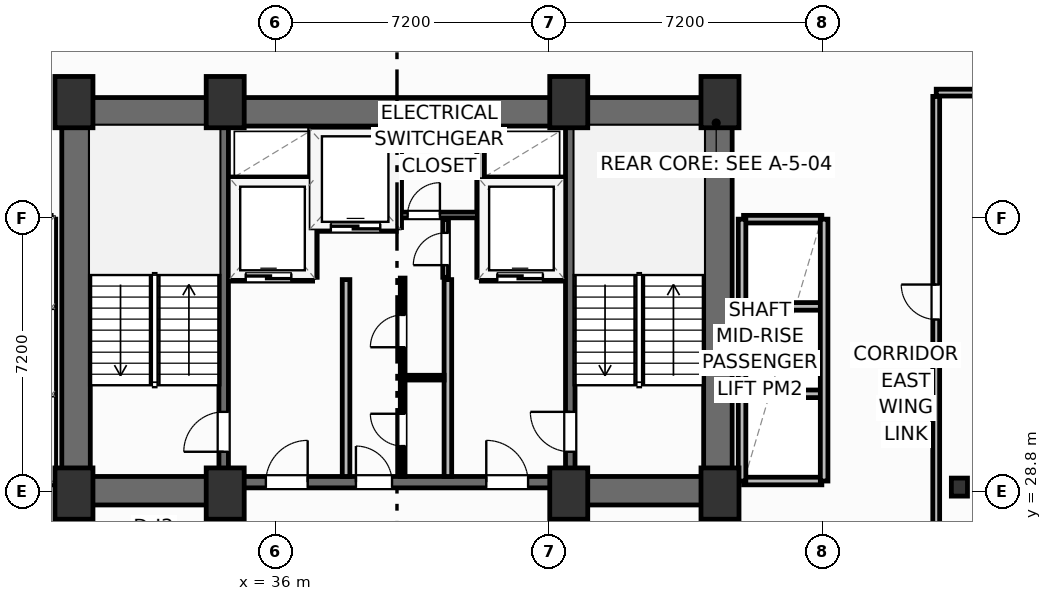
"""IFC4 building model, lengths in metres.
Left out: names, types, materials, properties, quantities, classifications, styles, units other than length and angle.
Written with IfcOpenShell. Run it as: python <this file> out.ifc"""

import sys

from ifc_helpers import new_model, si_unit, direction, frame, frame_2d, origin, origin_2d, place, context, subcontext, project, spatial, rectangle, i_section, extrude, element, fill, save


model = new_model("IFC4")
c1 = context("Model", 3, precision=1e-05, world=origin(), true_north=direction((0.0, 1.0)))
c2 = subcontext(c1, "Body", "Model", "MODEL_VIEW")
j1 = project(units=[si_unit("LENGTHUNIT", "METRE"), si_unit("PLANEANGLEUNIT", "RADIAN")], contexts=[c1])
p1 = place(None, origin())
s1 = spatial("IfcSite", under=j1, at=p1, CompositionType="ELEMENT")
p2 = place(p1, origin())
s2 = spatial("IfcBuilding", under=s1, at=p2, CompositionType="ELEMENT")
p3 = place(p2, frame((0.0, 0.0, 87.3)))
s3 = spatial("IfcBuildingStorey", under=s2, at=p3, CompositionType="ELEMENT", Elevation=87.3)
for number, where, z_axis, x_axis in (
    (1, (30.7, 28.75, 0.0), (0.0, 0.0, 1.0), (1.0, 0.0, 0.0)),
    (2, (34.68, 28.75, 0.0), (0.0, 0.0, 1.0), (1.0, 0.0, 0.0)),
    (3, (43.72, 28.75, 0.0), (0.0, 0.0, 1.0), (1.0, 0.0, 0.0)),
    (4, (47.7, 28.75, 0.0), (0.0, 0.0, 1.0), (1.0, 0.0, 0.0)),
    (5, (30.7, 39.05, 0.0), (0.0, 0.0, 1.0), (1.0, 0.0, 0.0)),
    (6, (34.68, 39.05, 0.0), (0.0, 0.0, 1.0), (1.0, 0.0, 0.0)),
    (7, (43.72, 39.05, 0.0), (0.0, 0.0, 1.0), (1.0, 0.0, 0.0)),
    (8, (47.7, 39.05, 0.0), (0.0, 0.0, 1.0), (1.0, 0.0, 0.0)),
):
    element("IfcColumn", number, at=place(p3, frame(where, z_axis=z_axis, x_axis=x_axis)), inside=s3, PredefinedType="COLUMN", context=c2, shape_type="SweptSolid", body=[
        extrude(rectangle(XDim=1.0, YDim=1.35, at=origin_2d()), origin(), (0.0, 0.0, 1.0), 3.7),
    ])
p4 = place(p3, frame((54.0, 28.92, 0.0), z_axis=(0.0, 0.0, 1.0), x_axis=(1.0, 0.0, 0.0)))
e9 = element("IfcColumn", 9, at=p4, inside=s3, PredefinedType="COLUMN", context=c2, shape_type="SweptSolid", body=[
    extrude(i_section(OverallWidth=0.424, OverallDepth=0.474, WebThickness=0.048, FlangeThickness=0.077, FilletRadius=0.025, at=origin_2d()), origin(), (0.0, 0.0, 1.0), 3.7),
])
p5 = place(p3, frame((30.38, 38.795, 0.0), z_axis=(0.0, 0.0, 1.0), x_axis=(1.0, 0.0, 0.0)))
e10 = element("IfcWall", 10, at=p5, inside=s3, PredefinedType="SHEAR", context=c2, shape_type="SweptSolid", body=[
    extrude(rectangle(XDim=17.64, YDim=0.75, at=frame_2d((8.82, 0.0))), origin(), (0.0, 0.0, 1.0), 3.45),
])
for number, where, z_axis, x_axis in (
    (11, (30.755, 29.2, 0.0), (0.0, 0.0, 1.0), (0.0, 1.0, 0.0)),
    (12, (47.645, 29.2, 0.0), (0.0, 0.0, 1.0), (0.0, 1.0, 0.0)),
):
    element("IfcWall", number, at=place(p3, frame(where, z_axis=z_axis, x_axis=x_axis)), inside=s3, PredefinedType="SHEAR", context=c2, shape_type="SweptSolid", body=[
        extrude(rectangle(XDim=9.22, YDim=0.75, at=frame_2d((4.61, 0.0))), origin(), (0.0, 0.0, 1.0), 3.45),
    ])
p6 = place(p3, frame((30.38, 28.825, 0.0), z_axis=(0.0, 0.0, 1.0), x_axis=(1.0, 0.0, 0.0)))
e13 = element("IfcWall", 13, at=p6, inside=s3, PredefinedType="SHEAR", context=c2, shape_type="SweptSolid", body=[
    extrude(rectangle(XDim=4.42, YDim=0.75, at=frame_2d((2.21, 0.0))), origin(), (0.0, 0.0, 1.0), 3.45),
])
p7 = place(p3, frame((43.6, 28.825, 0.0), z_axis=(0.0, 0.0, 1.0), x_axis=(1.0, 0.0, 0.0)))
e14 = element("IfcWall", 14, at=p7, inside=s3, PredefinedType="SHEAR", context=c2, shape_type="SweptSolid", body=[
    extrude(rectangle(XDim=4.42, YDim=0.75, at=frame_2d((2.21, 0.0))), origin(), (0.0, 0.0, 1.0), 3.45),
])
p8 = place(p3, frame((34.8, 29.05, 0.0), z_axis=(0.0, 0.0, 1.0), x_axis=(1.0, 0.0, 0.0)))
e15 = element("IfcWall", 15, at=p8, inside=s3, PredefinedType="SHEAR", context=c2, shape_type="SweptSolid", body=[
    extrude(rectangle(XDim=8.8, YDim=0.3, at=frame_2d((4.4, 0.0))), origin(), (0.0, 0.0, 1.0), 3.45),
])
p9 = place(p8, frame((0.95, 0.0, 0.0)))
e16 = element("IfcOpeningElement", 16, at=p9, cuts=e15, PredefinedType="OPENING", context=c2, shape_type="SweptSolid", body=[
    extrude(rectangle(XDim=1.1, YDim=2.15, at=frame_2d((0.55, 1.075))), frame((0.0, 0.16, 0.0), z_axis=(0.0, -1.0, 0.0), x_axis=(1.0, 0.0, 0.0)), (0.0, 0.0, 1.0), 0.32),
])
p10 = place(p8, frame((6.75, 0.0, 0.0)))
e17 = element("IfcOpeningElement", 17, at=p10, cuts=e15, PredefinedType="OPENING", context=c2, shape_type="SweptSolid", body=[
    extrude(rectangle(XDim=1.1, YDim=2.15, at=frame_2d((0.55, 1.075))), frame((0.0, 0.16, 0.0), z_axis=(0.0, -1.0, 0.0), x_axis=(1.0, 0.0, 0.0)), (0.0, 0.0, 1.0), 0.32),
])
p11 = place(p8, frame((3.32, 0.0, 0.0)))
e18 = element("IfcOpeningElement", 18, at=p11, cuts=e15, PredefinedType="OPENING", context=c2, shape_type="SweptSolid", body=[
    extrude(rectangle(XDim=0.95, YDim=2.15, at=frame_2d((0.475, 1.075))), frame((0.0, 0.16, 0.0), z_axis=(0.0, -1.0, 0.0), x_axis=(1.0, 0.0, 0.0)), (0.0, 0.0, 1.0), 0.32),
])
p12 = place(p3, frame((34.64, 29.2, 0.0), z_axis=(0.0, 0.0, 1.0), x_axis=(0.0, 1.0, 0.0)))
e19 = element("IfcWall", 19, at=p12, inside=s3, PredefinedType="SHEAR", context=c2, shape_type="SweptSolid", body=[
    extrude(rectangle(XDim=9.22, YDim=0.25, at=frame_2d((4.61, 0.0))), origin(), (0.0, 0.0, 1.0), 3.45),
])
p13 = place(p12, frame((0.65, 0.0, 0.0)))
e20 = element("IfcOpeningElement", 20, at=p13, cuts=e19, PredefinedType="OPENING", context=c2, shape_type="SweptSolid", body=[
    extrude(rectangle(XDim=1.05, YDim=2.15, at=frame_2d((0.525, 1.075))), frame((0.0, 0.135, 0.0), z_axis=(0.0, -1.0, 0.0), x_axis=(1.0, 0.0, 0.0)), (0.0, 0.0, 1.0), 0.27),
])
p14 = place(p3, frame((43.76, 29.2, 0.0), z_axis=(0.0, 0.0, 1.0), x_axis=(0.0, 1.0, 0.0)))
e21 = element("IfcWall", 21, at=p14, inside=s3, PredefinedType="SHEAR", context=c2, shape_type="SweptSolid", body=[
    extrude(rectangle(XDim=9.22, YDim=0.25, at=frame_2d((4.61, 0.0))), origin(), (0.0, 0.0, 1.0), 3.45),
])
p15 = place(p14, frame((0.65, 0.0, 0.0)))
e22 = element("IfcOpeningElement", 22, at=p15, cuts=e21, PredefinedType="OPENING", context=c2, shape_type="SweptSolid", body=[
    extrude(rectangle(XDim=1.05, YDim=2.15, at=frame_2d((0.525, 1.075))), frame((0.0, 0.135, 0.0), z_axis=(0.0, -1.0, 0.0), x_axis=(1.0, 0.0, 0.0)), (0.0, 0.0, 1.0), 0.27),
])
p16 = place(p3, frame((53.39, 27.53, 0.0), z_axis=(0.0, 0.0, 1.0), x_axis=(0.0, 1.0, 0.0)))
e23 = element("IfcWall", 23, at=p16, inside=s3, PredefinedType="PARTITIONING", context=c2, shape_type="SweptSolid", body=[
    extrude(rectangle(XDim=11.67, YDim=0.18, at=frame_2d((5.835, 0.0))), origin(), (0.0, 0.0, 1.0), 3.45),
])
p17 = place(p16, frame((5.8, 0.0, 0.0)))
e24 = element("IfcOpeningElement", 24, at=p17, cuts=e23, PredefinedType="OPENING", context=c2, shape_type="SweptSolid", body=[
    extrude(rectangle(XDim=0.92, YDim=2.05, at=frame_2d((0.46, 1.025))), frame((0.0, 0.1, 0.0), z_axis=(0.0, -1.0, 0.0), x_axis=(1.0, 0.0, 0.0)), (0.0, 0.0, 1.0), 0.2),
])
p18 = place(p3, frame((53.39, 39.3, 0.0), z_axis=(0.0, 0.0, 1.0), x_axis=(1.0, 0.0, 0.0)))
e25 = element("IfcWall", 25, at=p18, inside=s3, PredefinedType="PARTITIONING", context=c2, shape_type="SweptSolid", body=[
    extrude(rectangle(XDim=8.876, YDim=0.18, at=frame_2d((4.438, 0.0))), origin(), (0.0, 0.0, 1.0), 3.45),
])
for number, where, z_axis, x_axis in (
    (26, (37.86, 29.2, 0.0), (0.0, 0.0, 1.0), (0.0, 1.0, 0.0)),
    (27, (40.54, 29.2, 0.0), (0.0, 0.0, 1.0), (0.0, 1.0, 0.0)),
):
    element("IfcWall", number, at=place(p3, frame(where, z_axis=z_axis, x_axis=x_axis)), inside=s3, PredefinedType="PARTITIONING", context=c2, shape_type="SweptSolid", body=[
        extrude(rectangle(XDim=5.18, YDim=0.2, at=frame_2d((2.59, 0.0))), origin(), (0.0, 0.0, 1.0), 3.45),
    ])
p19 = place(p3, frame((34.8, 34.44, 0.0), z_axis=(0.0, 0.0, 1.0), x_axis=(1.0, 0.0, 0.0)))
e28 = element("IfcWall", 28, at=p19, inside=s3, PredefinedType="PARTITIONING", context=c2, shape_type="SweptSolid", body=[
    extrude(rectangle(XDim=2.18, YDim=0.2, at=frame_2d((1.09, 0.0))), origin(), (0.0, 0.0, 1.0), 3.45),
])
p20 = place(p19, frame((0.42, 0.0, 0.0)))
e29 = element("IfcOpeningElement", 29, at=p20, cuts=e28, PredefinedType="OPENING", context=c2, shape_type="SweptSolid", body=[
    extrude(rectangle(XDim=1.2, YDim=2.2, at=frame_2d((0.6, 1.1))), frame((0.0, 0.11, 0.0), z_axis=(0.0, -1.0, 0.0), x_axis=(1.0, 0.0, 0.0)), (0.0, 0.0, 1.0), 0.22),
])
p21 = place(p3, frame((34.8, 36.98, 0.0), z_axis=(0.0, 0.0, 1.0), x_axis=(1.0, 0.0, 0.0)))
e30 = element("IfcWall", 30, at=p21, inside=s3, PredefinedType="PARTITIONING", context=c2, shape_type="SweptSolid", body=[
    extrude(rectangle(XDim=2.18, YDim=0.2, at=frame_2d((1.09, 0.0))), origin(), (0.0, 0.0, 1.0), 3.45),
])
p22 = place(p3, frame((37.0, 34.44, 0.0), z_axis=(0.0, 0.0, 1.0), x_axis=(0.0, 1.0, 0.0)))
e31 = element("IfcWall", 31, at=p22, inside=s3, PredefinedType="PARTITIONING", context=c2, shape_type="SweptSolid", body=[
    extrude(rectangle(XDim=3.9, YDim=0.2, at=frame_2d((1.95, 0.0))), origin(), (0.0, 0.0, 1.0), 3.45),
])
p23 = place(p3, frame((41.42, 34.44, 0.0), z_axis=(0.0, 0.0, 1.0), x_axis=(1.0, 0.0, 0.0)))
e32 = element("IfcWall", 32, at=p23, inside=s3, PredefinedType="PARTITIONING", context=c2, shape_type="SweptSolid", body=[
    extrude(rectangle(XDim=2.18, YDim=0.2, at=frame_2d((1.09, 0.0))), origin(), (0.0, 0.0, 1.0), 3.45),
])
p24 = place(p23, frame((0.42, 0.0, 0.0)))
e33 = element("IfcOpeningElement", 33, at=p24, cuts=e32, PredefinedType="OPENING", context=c2, shape_type="SweptSolid", body=[
    extrude(rectangle(XDim=1.2, YDim=2.2, at=frame_2d((0.6, 1.1))), frame((0.0, 0.11, 0.0), z_axis=(0.0, -1.0, 0.0), x_axis=(1.0, 0.0, 0.0)), (0.0, 0.0, 1.0), 0.22),
])
p25 = place(p3, frame((41.42, 36.98, 0.0), z_axis=(0.0, 0.0, 1.0), x_axis=(1.0, 0.0, 0.0)))
e34 = element("IfcWall", 34, at=p25, inside=s3, PredefinedType="PARTITIONING", context=c2, shape_type="SweptSolid", body=[
    extrude(rectangle(XDim=2.18, YDim=0.2, at=frame_2d((1.09, 0.0))), origin(), (0.0, 0.0, 1.0), 3.45),
])
p26 = place(p3, frame((41.4, 34.44, 0.0), z_axis=(0.0, 0.0, 1.0), x_axis=(0.0, 1.0, 0.0)))
e35 = element("IfcWall", 35, at=p26, inside=s3, PredefinedType="PARTITIONING", context=c2, shape_type="SweptSolid", body=[
    extrude(rectangle(XDim=3.9, YDim=0.2, at=frame_2d((1.95, 0.0))), origin(), (0.0, 0.0, 1.0), 3.45),
])
p27 = place(p3, frame((37.06, 35.75, 0.0), z_axis=(0.0, 0.0, 1.0), x_axis=(1.0, 0.0, 0.0)))
e36 = element("IfcWall", 36, at=p27, inside=s3, PredefinedType="PARTITIONING", context=c2, shape_type="SweptSolid", body=[
    extrude(rectangle(XDim=2.12, YDim=0.2, at=frame_2d((1.06, 0.0))), origin(), (0.0, 0.0, 1.0), 3.45),
])
p28 = place(p27, frame((0.4, 0.0, 0.0)))
e37 = element("IfcOpeningElement", 37, at=p28, cuts=e36, PredefinedType="OPENING", context=c2, shape_type="SweptSolid", body=[
    extrude(rectangle(XDim=1.3, YDim=2.2, at=frame_2d((0.65, 1.1))), frame((0.0, 0.11, 0.0), z_axis=(0.0, -1.0, 0.0), x_axis=(1.0, 0.0, 0.0)), (0.0, 0.0, 1.0), 0.22),
])
p29 = place(p3, frame((39.22, 35.75, 0.0), z_axis=(0.0, 0.0, 1.0), x_axis=(0.0, 1.0, 0.0)))
e38 = element("IfcWall", 38, at=p29, inside=s3, PredefinedType="PARTITIONING", context=c2, shape_type="SweptSolid", body=[
    extrude(rectangle(XDim=2.59, YDim=0.2, at=frame_2d((1.295, 0.0))), origin(), (0.0, 0.0, 1.0), 3.45),
])
p30 = place(p3, frame((39.3, 36.08, 0.0), z_axis=(0.0, 0.0, 1.0), x_axis=(1.0, 0.0, 0.0)))
e39 = element("IfcWall", 39, at=p30, inside=s3, PredefinedType="PARTITIONING", context=c2, shape_type="SweptSolid", body=[
    extrude(rectangle(XDim=2.02, YDim=0.15, at=frame_2d((1.01, 0.0))), origin(), (0.0, 0.0, 1.0), 3.45),
])
p31 = place(p30, frame((0.18, 0.0, 0.0)))
e40 = element("IfcOpeningElement", 40, at=p31, cuts=e39, PredefinedType="OPENING", context=c2, shape_type="SweptSolid", body=[
    extrude(rectangle(XDim=0.85, YDim=2.05, at=frame_2d((0.425, 1.025))), frame((0.0, 0.085, 0.0), z_axis=(0.0, -1.0, 0.0), x_axis=(1.0, 0.0, 0.0)), (0.0, 0.0, 1.0), 0.17),
])
p32 = place(p3, frame((40.48, 34.44, 0.0), z_axis=(0.0, 0.0, 1.0), x_axis=(0.0, 1.0, 0.0)))
e41 = element("IfcWall", 41, at=p32, inside=s3, PredefinedType="PARTITIONING", context=c2, shape_type="SweptSolid", body=[
    extrude(rectangle(XDim=1.52, YDim=0.15, at=frame_2d((0.76, 0.0))), origin(), (0.0, 0.0, 1.0), 3.45),
])
p33 = place(p32, frame((0.32, 0.0, 0.0)))
e42 = element("IfcOpeningElement", 42, at=p33, cuts=e41, PredefinedType="OPENING", context=c2, shape_type="SweptSolid", body=[
    extrude(rectangle(XDim=0.85, YDim=2.05, at=frame_2d((0.425, 1.025))), frame((0.0, 0.085, 0.0), z_axis=(0.0, -1.0, 0.0), x_axis=(1.0, 0.0, 0.0)), (0.0, 0.0, 1.0), 0.17),
])
p34 = place(p3, frame((39.35, 31.8, 0.0), z_axis=(0.0, 0.0, 1.0), x_axis=(1.0, 0.0, 0.0)))
e43 = element("IfcWall", 43, at=p34, inside=s3, PredefinedType="PARTITIONING", context=c2, shape_type="SweptSolid", body=[
    extrude(rectangle(XDim=1.09, YDim=0.125, at=frame_2d((0.545, 0.0))), origin(), (0.0, 0.0, 1.0), 3.45),
])
p35 = place(p3, frame((39.35, 29.2, 0.0), z_axis=(0.0, 0.0, 1.0), x_axis=(0.0, 1.0, 0.0)))
e44 = element("IfcWall", 44, at=p35, inside=s3, PredefinedType="PARTITIONING", context=c2, shape_type="SweptSolid", body=[
    extrude(rectangle(XDim=5.22, YDim=0.125, at=frame_2d((2.61, 0.0))), origin(), (0.0, 0.0, 1.0), 3.45),
])
p36 = place(p35, frame((0.8, 0.0, 0.0)))
e45 = element("IfcOpeningElement", 45, at=p36, cuts=e44, PredefinedType="OPENING", context=c2, shape_type="SweptSolid", body=[
    extrude(rectangle(XDim=0.85, YDim=2.05, at=frame_2d((0.425, 1.025))), frame((0.0, 0.073, 0.0), z_axis=(0.0, -1.0, 0.0), x_axis=(1.0, 0.0, 0.0)), (0.0, 0.0, 1.0), 0.145),
])
p37 = place(p35, frame((3.4, 0.0, 0.0)))
e46 = element("IfcOpeningElement", 46, at=p37, cuts=e44, PredefinedType="OPENING", context=c2, shape_type="SweptSolid", body=[
    extrude(rectangle(XDim=0.85, YDim=2.05, at=frame_2d((0.425, 1.025))), frame((0.0, 0.073, 0.0), z_axis=(0.0, -1.0, 0.0), x_axis=(1.0, 0.0, 0.0)), (0.0, 0.0, 1.0), 0.145),
])
p38 = place(p3, frame((30.12, 29.08, 0.0), z_axis=(0.0, 0.0, 1.0), x_axis=(0.0, 1.0, 0.0)))
e47 = element("IfcWall", 47, at=p38, inside=s3, PredefinedType="PARTITIONING", context=c2, shape_type="SweptSolid", body=[
    extrude(rectangle(XDim=6.89, YDim=0.2, at=frame_2d((3.445, 0.0))), origin(), (0.0, 0.0, 1.0), 3.45),
])
for number, where, z_axis, x_axis in (
    (48, (48.32, 31.375, 0.0), (0.0, 0.0, 1.0), (1.0, 0.0, 0.0)),
    (49, (48.32, 33.675, 0.0), (0.0, 0.0, 1.0), (1.0, 0.0, 0.0)),
):
    element("IfcWall", number, at=place(p3, frame(where, z_axis=z_axis, x_axis=x_axis)), inside=s3, PredefinedType="PARTITIONING", context=c2, shape_type="SweptSolid", body=[
        extrude(rectangle(XDim=2.06, YDim=0.2, at=frame_2d((1.03, 0.0))), origin(), (0.0, 0.0, 1.0), 3.45),
    ])
p39 = place(p3, frame((48.32, 29.08, 0.0), z_axis=(0.0, 0.0, 1.0), x_axis=(1.0, 0.0, 0.0)))
e50 = element("IfcWall", 50, at=p39, inside=s3, PredefinedType="PARTITIONING", context=c2, shape_type="SweptSolid", body=[
    extrude(rectangle(XDim=2.06, YDim=0.2, at=frame_2d((1.03, 0.0))), origin(), (0.0, 0.0, 1.0), 2.662),
])
p40 = place(p3, frame((48.32, 35.97, 0.0), z_axis=(0.0, 0.0, 1.0), x_axis=(1.0, 0.0, 0.0)))
e51 = element("IfcWall", 51, at=p40, inside=s3, PredefinedType="PARTITIONING", context=c2, shape_type="SweptSolid", body=[
    extrude(rectangle(XDim=2.06, YDim=0.2, at=frame_2d((1.03, 0.0))), origin(), (0.0, 0.0, 1.0), 3.45),
])
for number, where, z_axis, x_axis in (
    (52, (48.28, 29.08, 0.0), (0.0, 0.0, 1.0), (0.0, 1.0, 0.0)),
    (53, (50.44, 29.08, 0.0), (0.0, 0.0, 1.0), (0.0, 1.0, 0.0)),
):
    element("IfcWall", number, at=place(p3, frame(where, z_axis=z_axis, x_axis=x_axis)), inside=s3, PredefinedType="PARTITIONING", context=c2, shape_type="SweptSolid", body=[
        extrude(rectangle(XDim=6.89, YDim=0.2, at=frame_2d((3.445, 0.0))), origin(), (0.0, 0.0, 1.0), 3.45),
    ])
p41 = place(p17, origin())
e54 = element("IfcDoor", 54, at=p41, inside=s3, OperationType="SINGLE_SWING_RIGHT", PredefinedType="DOOR", context=c2, shape_type="SweptSolid", body=[
    extrude(rectangle(XDim=0.92, YDim=2.05, at=frame_2d((0.46, 1.025))), frame((0.0, 0.025, 0.0), z_axis=(0.0, -1.0, 0.0), x_axis=(1.0, 0.0, 0.0)), (0.0, 0.0, 1.0), 0.05),
])
fill(e24, e54)
p42 = place(p13, origin())
e55 = element("IfcDoor", 55, at=p42, inside=s3, OperationType="SINGLE_SWING_LEFT", PredefinedType="DOOR", context=c2, shape_type="SweptSolid", body=[
    extrude(rectangle(XDim=1.05, YDim=2.15, at=frame_2d((0.525, 1.075))), frame((0.0, 0.025, 0.0), z_axis=(0.0, -1.0, 0.0), x_axis=(1.0, 0.0, 0.0)), (0.0, 0.0, 1.0), 0.05),
])
fill(e20, e55)
p43 = place(p15, origin())
e56 = element("IfcDoor", 56, at=p43, inside=s3, OperationType="SINGLE_SWING_RIGHT", PredefinedType="DOOR", context=c2, shape_type="SweptSolid", body=[
    extrude(rectangle(XDim=1.05, YDim=2.15, at=frame_2d((0.525, 1.075))), frame((0.0, 0.025, 0.0), z_axis=(0.0, -1.0, 0.0), x_axis=(1.0, 0.0, 0.0)), (0.0, 0.0, 1.0), 0.05),
])
fill(e22, e56)
p44 = place(p9, origin())
e57 = element("IfcDoor", 57, at=p44, inside=s3, OperationType="SINGLE_SWING_RIGHT", PredefinedType="DOOR", context=c2, shape_type="SweptSolid", body=[
    extrude(rectangle(XDim=1.1, YDim=2.15, at=frame_2d((0.55, 1.075))), frame((0.0, 0.025, 0.0), z_axis=(0.0, -1.0, 0.0), x_axis=(1.0, 0.0, 0.0)), (0.0, 0.0, 1.0), 0.05),
])
fill(e16, e57)
p45 = place(p10, origin())
e58 = element("IfcDoor", 58, at=p45, inside=s3, OperationType="SINGLE_SWING_LEFT", PredefinedType="DOOR", context=c2, shape_type="SweptSolid", body=[
    extrude(rectangle(XDim=1.1, YDim=2.15, at=frame_2d((0.55, 1.075))), frame((0.0, 0.025, 0.0), z_axis=(0.0, -1.0, 0.0), x_axis=(1.0, 0.0, 0.0)), (0.0, 0.0, 1.0), 0.05),
])
fill(e17, e58)
p46 = place(p20, origin())
e59 = element("IfcDoor", 59, at=p46, inside=s3, OperationType="SLIDING_TO_LEFT", PredefinedType="DOOR", context=c2, shape_type="SweptSolid", body=[
    extrude(rectangle(XDim=1.2, YDim=2.2, at=frame_2d((0.6, 1.1))), frame((0.0, 0.025, 0.0), z_axis=(0.0, -1.0, 0.0), x_axis=(1.0, 0.0, 0.0)), (0.0, 0.0, 1.0), 0.05),
])
fill(e29, e59)
p47 = place(p24, origin())
e60 = element("IfcDoor", 60, at=p47, inside=s3, OperationType="SLIDING_TO_LEFT", PredefinedType="DOOR", context=c2, shape_type="SweptSolid", body=[
    extrude(rectangle(XDim=1.2, YDim=2.2, at=frame_2d((0.6, 1.1))), frame((0.0, 0.025, 0.0), z_axis=(0.0, -1.0, 0.0), x_axis=(1.0, 0.0, 0.0)), (0.0, 0.0, 1.0), 0.05),
])
fill(e33, e60)
p48 = place(p28, origin())
e61 = element("IfcDoor", 61, at=p48, inside=s3, OperationType="SLIDING_TO_LEFT", PredefinedType="DOOR", context=c2, shape_type="SweptSolid", body=[
    extrude(rectangle(XDim=1.3, YDim=2.2, at=frame_2d((0.65, 1.1))), frame((0.0, 0.025, 0.0), z_axis=(0.0, -1.0, 0.0), x_axis=(1.0, 0.0, 0.0)), (0.0, 0.0, 1.0), 0.05),
])
fill(e37, e61)
p49 = place(p31, origin())
e62 = element("IfcDoor", 62, at=p49, inside=s3, OperationType="SINGLE_SWING_RIGHT", PredefinedType="DOOR", context=c2, shape_type="SweptSolid", body=[
    extrude(rectangle(XDim=0.85, YDim=2.05, at=frame_2d((0.425, 1.025))), frame((0.0, 0.025, 0.0), z_axis=(0.0, -1.0, 0.0), x_axis=(1.0, 0.0, 0.0)), (0.0, 0.0, 1.0), 0.05),
])
fill(e40, e62)
p50 = place(p33, origin())
e63 = element("IfcDoor", 63, at=p50, inside=s3, OperationType="SINGLE_SWING_LEFT", PredefinedType="DOOR", context=c2, shape_type="SweptSolid", body=[
    extrude(rectangle(XDim=0.85, YDim=2.05, at=frame_2d((0.425, 1.025))), frame((0.0, 0.025, 0.0), z_axis=(0.0, -1.0, 0.0), x_axis=(1.0, 0.0, 0.0)), (0.0, 0.0, 1.0), 0.05),
])
fill(e42, e63)
p51 = place(p36, origin())
e64 = element("IfcDoor", 64, at=p51, inside=s3, OperationType="SINGLE_SWING_RIGHT", PredefinedType="DOOR", context=c2, shape_type="SweptSolid", body=[
    extrude(rectangle(XDim=0.85, YDim=2.05, at=frame_2d((0.425, 1.025))), frame((0.0, 0.025, 0.0), z_axis=(0.0, -1.0, 0.0), x_axis=(1.0, 0.0, 0.0)), (0.0, 0.0, 1.0), 0.05),
])
fill(e45, e64)
p52 = place(p37, origin())
e65 = element("IfcDoor", 65, at=p52, inside=s3, OperationType="SINGLE_SWING_LEFT", PredefinedType="DOOR", context=c2, shape_type="SweptSolid", body=[
    extrude(rectangle(XDim=0.85, YDim=2.05, at=frame_2d((0.425, 1.025))), frame((0.0, 0.025, 0.0), z_axis=(0.0, -1.0, 0.0), x_axis=(1.0, 0.0, 0.0)), (0.0, 0.0, 1.0), 0.05),
])
fill(e46, e65)
p53 = place(p11, origin())
e66 = element("IfcDoor", 66, at=p53, inside=s3, OperationType="SINGLE_SWING_LEFT", PredefinedType="DOOR", context=c2, shape_type="SweptSolid", body=[
    extrude(rectangle(XDim=0.95, YDim=2.15, at=frame_2d((0.475, 1.075))), frame((0.0, 0.025, 0.0), z_axis=(0.0, -1.0, 0.0), x_axis=(1.0, 0.0, 0.0)), (0.0, 0.0, 1.0), 0.05),
])
fill(e18, e66)
save(model, sys.argv[1])
